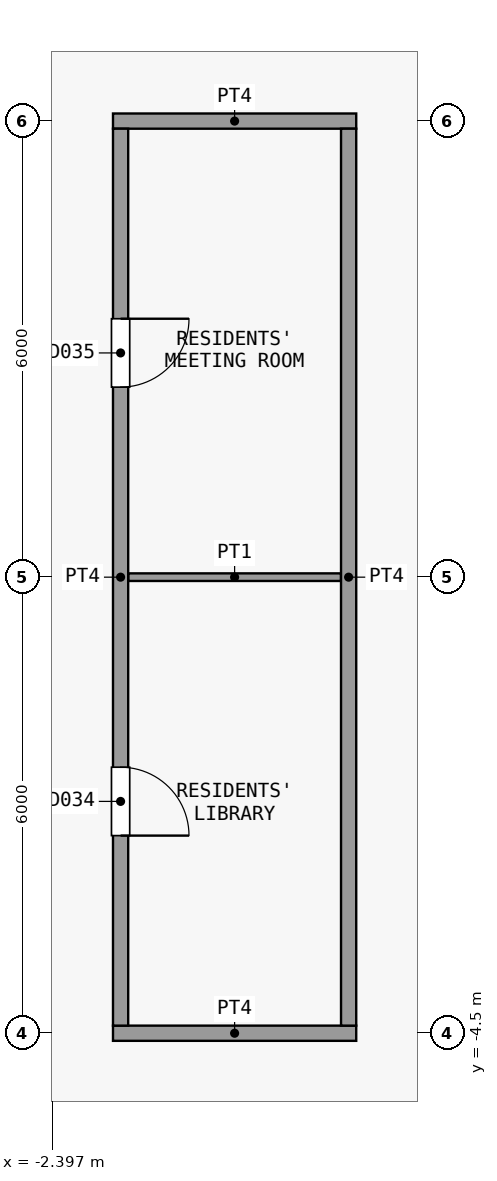
"""IFC4 building model, lengths in metres.
Left out: names, types, materials, properties, quantities, classifications, styles, units other than length and angle.
Written with IfcOpenShell. Run it as: python <this file> out.ifc"""

import sys

from ifc_helpers import new_model, si_unit, direction, frame, frame_2d, origin, place, context, subcontext, project, spatial, rectangle, extrude, element, fill, save


model = new_model("IFC4")
c1 = context("Model", 3, precision=1e-05, world=origin(), true_north=direction((0.0, 1.0)))
c2 = subcontext(c1, "Body", "Model", "MODEL_VIEW")
j1 = project(units=[si_unit("LENGTHUNIT", "METRE"), si_unit("PLANEANGLEUNIT", "RADIAN")], contexts=[c1])
p1 = place(None, origin())
s1 = spatial("IfcSite", under=j1, at=p1, CompositionType="ELEMENT")
p2 = place(p1, origin())
s2 = spatial("IfcBuilding", under=s1, at=p2, CompositionType="ELEMENT")
p3 = place(p2, frame((0.0, 0.0, 196.1)))
s3 = spatial("IfcBuildingStorey", under=s2, at=p3, CompositionType="ELEMENT", Elevation=196.1)
p4 = place(p3, frame((-1.6, -4.5, 0.0), z_axis=(0.0, 0.0, 1.0), x_axis=(1.0, 0.0, 0.0)))
e1 = element("IfcWall", 1, at=p4, inside=s3, PredefinedType="PARTITIONING", context=c2, shape_type="SweptSolid", body=[
    extrude(rectangle(XDim=3.2, YDim=0.2, at=frame_2d((1.6, 0.0))), origin(), (0.0, 0.0, 1.0), 3.15),
])
p5 = place(p3, frame((-1.4, 1.5, 0.0), z_axis=(0.0, 0.0, 1.0), x_axis=(1.0, 0.0, 0.0)))
e2 = element("IfcWall", 2, at=p5, inside=s3, PredefinedType="PARTITIONING", context=c2, shape_type="SweptSolid", body=[
    extrude(rectangle(XDim=2.8, YDim=0.1, at=frame_2d((1.4, 0.0))), origin(), (0.0, 0.0, 1.0), 3.15),
])
p6 = place(p3, frame((-1.6, 7.5, 0.0), z_axis=(0.0, 0.0, 1.0), x_axis=(1.0, 0.0, 0.0)))
e3 = element("IfcWall", 3, at=p6, inside=s3, PredefinedType="PARTITIONING", context=c2, shape_type="SweptSolid", body=[
    extrude(rectangle(XDim=3.2, YDim=0.2, at=frame_2d((1.6, 0.0))), origin(), (0.0, 0.0, 1.0), 3.15),
])
p7 = place(p3, frame((-1.5, -4.4, 0.0), z_axis=(0.0, 0.0, 1.0), x_axis=(0.0, 1.0, 0.0)))
e4 = element("IfcWall", 4, at=p7, inside=s3, PredefinedType="PARTITIONING", context=c2, shape_type="SweptSolid", body=[
    extrude(rectangle(XDim=11.8, YDim=0.2, at=frame_2d((5.9, 0.0))), origin(), (0.0, 0.0, 1.0), 3.15),
])
p8 = place(p7, frame((2.5, 0.0, 0.0)))
e5 = element("IfcOpeningElement", 5, at=p8, cuts=e4, PredefinedType="OPENING", context=c2, shape_type="SweptSolid", body=[
    extrude(rectangle(XDim=0.9, YDim=2.1, at=frame_2d((0.45, 1.05))), frame((0.0, 0.11, 0.0), z_axis=(0.0, -1.0, 0.0), x_axis=(1.0, 0.0, 0.0)), (0.0, 0.0, 1.0), 0.22),
])
p9 = place(p7, frame((8.4, 0.0, 0.0)))
e6 = element("IfcOpeningElement", 6, at=p9, cuts=e4, PredefinedType="OPENING", context=c2, shape_type="SweptSolid", body=[
    extrude(rectangle(XDim=0.9, YDim=2.1, at=frame_2d((0.45, 1.05))), frame((0.0, 0.11, 0.0), z_axis=(0.0, -1.0, 0.0), x_axis=(1.0, 0.0, 0.0)), (0.0, 0.0, 1.0), 0.22),
])
p10 = place(p3, frame((1.5, -4.4, 0.0), z_axis=(0.0, 0.0, 1.0), x_axis=(0.0, 1.0, 0.0)))
e7 = element("IfcWall", 7, at=p10, inside=s3, PredefinedType="PARTITIONING", context=c2, shape_type="SweptSolid", body=[
    extrude(rectangle(XDim=11.8, YDim=0.2, at=frame_2d((5.9, 0.0))), origin(), (0.0, 0.0, 1.0), 3.15),
])
p11 = place(p8, origin())
e8 = element("IfcDoor", 8, at=p11, inside=s3, OperationType="SINGLE_SWING_LEFT", PredefinedType="DOOR", context=c2, shape_type="SweptSolid", body=[
    extrude(rectangle(XDim=0.9, YDim=2.1, at=frame_2d((0.45, 1.05))), frame((0.0, 0.025, 0.0), z_axis=(0.0, -1.0, 0.0), x_axis=(1.0, 0.0, 0.0)), (0.0, 0.0, 1.0), 0.05),
])
fill(e5, e8)
p12 = place(p9, origin())
e9 = element("IfcDoor", 9, at=p12, inside=s3, OperationType="SINGLE_SWING_RIGHT", PredefinedType="DOOR", context=c2, shape_type="SweptSolid", body=[
    extrude(rectangle(XDim=0.9, YDim=2.1, at=frame_2d((0.45, 1.05))), frame((0.0, 0.025, 0.0), z_axis=(0.0, -1.0, 0.0), x_axis=(1.0, 0.0, 0.0)), (0.0, 0.0, 1.0), 0.05),
])
fill(e6, e9)
save(model, sys.argv[1])
